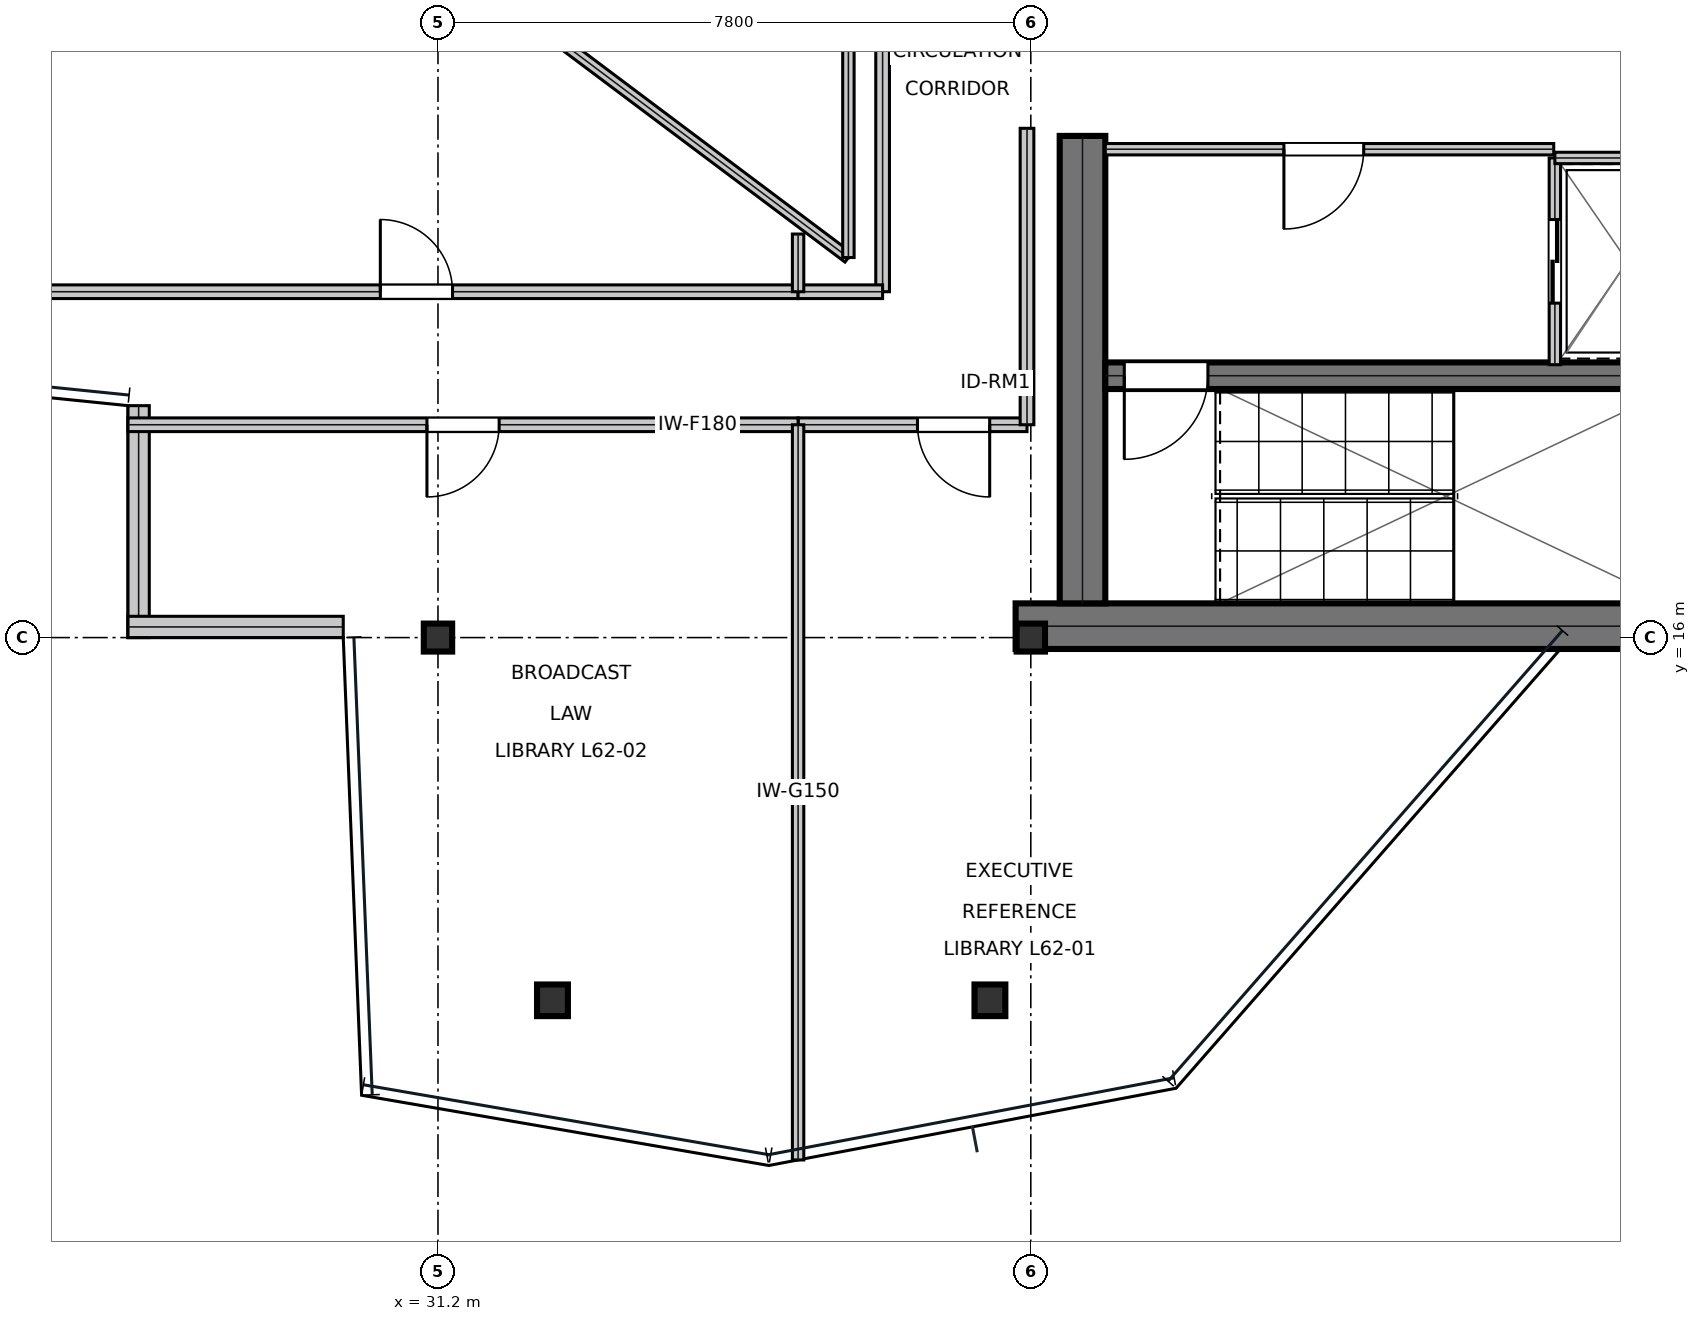
"""IFC4 building model, lengths in metres.
Left out: names, types, materials, properties, quantities, classifications, styles, units other than length and angle.
Written with IfcOpenShell. Run it as: python <this file> out.ifc"""

import sys

from ifc_helpers import new_model, si_unit, direction, frame, frame_2d, origin, origin_2d, place, context, subcontext, project, spatial, rectangle, i_section, extrude, element, fill, save


model = new_model("IFC4")
c1 = context("Model", 3, precision=1e-05, world=origin(), true_north=direction((0.0, 1.0)))
c2 = subcontext(c1, "Body", "Model", "MODEL_VIEW")
j1 = project(units=[si_unit("LENGTHUNIT", "METRE"), si_unit("PLANEANGLEUNIT", "RADIAN")], contexts=[c1])
p1 = place(None, origin())
s1 = spatial("IfcSite", under=j1, at=p1, CompositionType="ELEMENT")
p2 = place(p1, origin())
s2 = spatial("IfcBuilding", under=s1, at=p2, CompositionType="ELEMENT")
p3 = place(p2, frame((0.0, 0.0, 266.85)))
s3 = spatial("IfcBuildingStorey", under=s2, at=p3, CompositionType="ELEMENT", Elevation=266.85)
p4 = place(p3, frame((38.8, 16.15, 0.0), z_axis=(0.0, 0.0, 1.0), x_axis=(1.0, 0.0, 0.0)))
e1 = element("IfcWall", 1, at=p4, inside=s3, PredefinedType="SHEAR", context=c2, shape_type="SweptSolid", body=[
    extrude(rectangle(XDim=16.0, YDim=0.6, at=frame_2d((8.0, 0.0))), origin(), (0.0, 0.0, 1.0), 3.81),
])
p5 = place(p3, frame((39.68, 16.45, 0.0), z_axis=(0.0, 0.0, 1.0), x_axis=(0.0, 1.0, 0.0)))
e2 = element("IfcWall", 2, at=p5, inside=s3, PredefinedType="SHEAR", context=c2, shape_type="SweptSolid", body=[
    extrude(rectangle(XDim=6.15, YDim=0.6, at=frame_2d((3.075, 0.0))), origin(), (0.0, 0.0, 1.0), 3.81),
])
p6 = place(p3, frame((39.98, 19.445, 0.0), z_axis=(0.0, 0.0, 1.0), x_axis=(1.0, 0.0, 0.0)))
e3 = element("IfcWall", 3, at=p6, inside=s3, PredefinedType="SHEAR", context=c2, shape_type="SweptSolid", body=[
    extrude(rectangle(XDim=7.71, YDim=0.35, at=frame_2d((3.855, 0.0))), origin(), (0.0, 0.0, 1.0), 3.81),
])
p7 = place(p6, frame((0.25, 0.0, 0.0)))
e4 = element("IfcOpeningElement", 4, at=p7, cuts=e3, PredefinedType="OPENING", context=c2, shape_type="SweptSolid", body=[
    extrude(rectangle(XDim=1.1, YDim=2.15, at=frame_2d((0.55, 1.075))), frame((0.0, 0.185, 0.0), z_axis=(0.0, -1.0, 0.0), x_axis=(1.0, 0.0, 0.0)), (0.0, 0.0, 1.0), 0.37),
])
for number, where, z_axis, x_axis in (
    (5, (31.2, 16.0, 0.0), (0.0, 0.0, 1.0), (1.0, 0.0, 0.0)),
    (6, (39.0, 16.0, 0.0), (0.0, 0.0, 1.0), (1.0, 0.0, 0.0)),
):
    element("IfcColumn", number, at=place(p3, frame(where, z_axis=z_axis, x_axis=x_axis)), inside=s3, PredefinedType="COLUMN", context=c2, shape_type="SweptSolid", body=[
        extrude(i_section(OverallWidth=0.373, OverallDepth=0.368, WebThickness=0.015, FlangeThickness=0.024, at=origin_2d()), origin(), (0.0, 0.0, 1.0), 4.044),
    ])
for number, where, z_axis, x_axis in (
    (7, (32.706, 11.228, 0.016), (0.0, 0.0, 1.0), (1.0, 0.0, 0.0)),
    (8, (38.462, 11.228, 0.016), (0.0, 0.0, 1.0), (1.0, 0.0, 0.0)),
):
    element("IfcColumn", number, at=place(p3, frame(where, z_axis=z_axis, x_axis=x_axis)), inside=s3, PredefinedType="COLUMN", context=c2, shape_type="SweptSolid", body=[
        extrude(i_section(OverallWidth=0.406, OverallDepth=0.416, WebThickness=0.03, FlangeThickness=0.048, at=origin_2d()), origin(), (0.0, 0.0, 1.0), 4.018),
    ])
p8 = place(p3, frame((27.262, 19.051, 0.0), z_axis=(0.0, 0.0, 1.0), x_axis=(0.0, -1.0, 0.0)))
e9 = element("IfcWall", 9, at=p8, inside=s3, PredefinedType="STANDARD", context=c2, shape_type="SweptSolid", body=[
    extrude(rectangle(XDim=3.051, YDim=0.28, at=frame_2d((1.526, 0.0))), origin(), (0.0, 0.0, 1.0), 3.339),
])
p9 = place(p3, frame((27.122, 16.14, 0.0), z_axis=(0.0, 0.0, 1.0), x_axis=(1.0, 0.0, 0.0)))
e10 = element("IfcWall", 10, at=p9, inside=s3, PredefinedType="STANDARD", context=c2, shape_type="SweptSolid", body=[
    extrude(rectangle(XDim=2.832, YDim=0.28, at=frame_2d((1.416, 0.0))), origin(), (0.0, 0.0, 1.0), 3.81),
])
p10 = place(p3, frame((39.98, 22.425, 0.0), z_axis=(0.0, 0.0, 1.0), x_axis=(1.0, 0.0, 0.0)))
e11 = element("IfcWall", 11, at=p10, inside=s3, PredefinedType="PARTITIONING", context=c2, shape_type="SweptSolid", body=[
    extrude(rectangle(XDim=5.9, YDim=0.15, at=frame_2d((2.95, 0.0))), origin(), (0.0, 0.0, 1.0), 3.81),
])
p11 = place(p10, frame((2.35, 0.0, 0.0)))
e12 = element("IfcOpeningElement", 12, at=p11, cuts=e11, PredefinedType="OPENING", context=c2, shape_type="SweptSolid", body=[
    extrude(rectangle(XDim=1.05, YDim=2.15, at=frame_2d((0.525, 1.075))), frame((0.0, 0.085, 0.0), z_axis=(0.0, -1.0, 0.0), x_axis=(1.0, 0.0, 0.0)), (0.0, 0.0, 1.0), 0.17),
])
p12 = place(p3, frame((45.895, 19.59, 0.0), z_axis=(0.0, 0.0, 1.0), x_axis=(0.0, 1.0, 0.0)))
e13 = element("IfcWall", 13, at=p12, inside=s3, PredefinedType="PARTITIONING", context=c2, shape_type="SweptSolid", body=[
    extrude(rectangle(XDim=2.72, YDim=0.15, at=frame_2d((1.36, 0.0))), origin(), (0.0, 0.0, 1.0), 3.81),
])
p13 = place(p12, frame((0.81, 0.0, 0.0)))
e14 = element("IfcOpeningElement", 14, at=p13, cuts=e13, PredefinedType="OPENING", context=c2, shape_type="SweptSolid", body=[
    extrude(rectangle(XDim=1.1, YDim=2.15, at=frame_2d((0.55, 1.075))), frame((0.0, 0.085, 0.0), z_axis=(0.0, -1.0, 0.0), x_axis=(1.0, 0.0, 0.0)), (0.0, 0.0, 1.0), 0.17),
])
p14 = place(p3, frame((45.895, 22.31, 0.0), z_axis=(0.0, 0.0, 1.0), x_axis=(1.0, 0.0, 0.0)))
e15 = element("IfcWall", 15, at=p14, inside=s3, PredefinedType="PARTITIONING", context=c2, shape_type="SweptSolid", body=[
    extrude(rectangle(XDim=1.915, YDim=0.15, at=frame_2d((0.958, 0.0))), origin(), (0.0, 0.0, 1.0), 3.81),
])
p15 = place(p3, frame((35.938, 18.8, 0.0), z_axis=(0.0, 0.0, 1.0), x_axis=(1.0, 0.0, 0.0)))
e16 = element("IfcWall", 16, at=p15, inside=s3, PredefinedType="SOLIDWALL", context=c2, shape_type="SweptSolid", body=[
    extrude(rectangle(XDim=3.012, YDim=0.18, at=frame_2d((1.506, 0.0))), origin(), (0.0, 0.0, 1.0), 3.81),
])
p16 = place(p15, frame((1.571, 0.0, 0.0)))
e17 = element("IfcOpeningElement", 17, at=p16, cuts=e16, PredefinedType="OPENING", context=c2, shape_type="SweptSolid", body=[
    extrude(rectangle(XDim=0.95, YDim=2.15, at=frame_2d((0.475, 1.075))), frame((0.0, 0.1, 0.0), z_axis=(0.0, -1.0, 0.0), x_axis=(1.0, 0.0, 0.0)), (0.0, 0.0, 1.0), 0.2),
])
p17 = place(p3, frame((27.122, 18.8, 0.0), z_axis=(0.0, 0.0, 1.0), x_axis=(1.0, 0.0, 0.0)))
e18 = element("IfcWall", 18, at=p17, inside=s3, PredefinedType="SOLIDWALL", context=c2, shape_type="SweptSolid", body=[
    extrude(rectangle(XDim=8.816, YDim=0.18, at=frame_2d((4.408, 0.0))), origin(), (0.0, 0.0, 1.0), 3.27),
])
p18 = place(p17, frame((3.933, 0.0, 0.0)))
e19 = element("IfcOpeningElement", 19, at=p18, cuts=e18, PredefinedType="OPENING", context=c2, shape_type="SweptSolid", body=[
    extrude(rectangle(XDim=0.95, YDim=2.15, at=frame_2d((0.475, 1.075))), frame((0.0, 0.1, 0.0), z_axis=(0.0, -1.0, 0.0), x_axis=(1.0, 0.0, 0.0)), (0.0, 0.0, 1.0), 0.2),
])
p19 = place(p3, frame((25.895, 20.55, 0.0), z_axis=(0.0, 0.0, 1.0), x_axis=(1.0, 0.0, 0.0)))
e20 = element("IfcWall", 20, at=p19, inside=s3, PredefinedType="SOLIDWALL", context=c2, shape_type="SweptSolid", body=[
    extrude(rectangle(XDim=10.043, YDim=0.18, at=frame_2d((5.021, 0.0))), origin(), (0.0, 0.0, 1.0), 3.27),
])
p20 = place(p19, frame((4.546, 0.0, 0.0)))
e21 = element("IfcOpeningElement", 21, at=p20, cuts=e20, PredefinedType="OPENING", context=c2, shape_type="SweptSolid", body=[
    extrude(rectangle(XDim=0.95, YDim=2.15, at=frame_2d((0.475, 1.075))), frame((0.0, 0.1, 0.0), z_axis=(0.0, -1.0, 0.0), x_axis=(1.0, 0.0, 0.0)), (0.0, 0.0, 1.0), 0.2),
])
p21 = place(p3, frame((38.95, 18.8, 0.0), z_axis=(0.0, 0.0, 1.0), x_axis=(0.0, 1.0, 0.0)))
e22 = element("IfcWall", 22, at=p21, inside=s3, PredefinedType="SOLIDWALL", context=c2, shape_type="SweptSolid", body=[
    extrude(rectangle(XDim=3.9, YDim=0.18, at=frame_2d((1.95, 0.0))), origin(), (0.0, 0.0, 1.0), 3.54),
])
p22 = place(p3, frame((37.05, 20.55, 0.0), z_axis=(0.0, 0.0, 1.0), x_axis=(0.0, 1.0, 0.0)))
e23 = element("IfcWall", 23, at=p22, inside=s3, PredefinedType="SOLIDWALL", context=c2, shape_type="SweptSolid", body=[
    extrude(rectangle(XDim=8.25, YDim=0.18, at=frame_2d((4.125, 0.0))), origin(), (0.0, 0.0, 1.0), 3.54),
])
p23 = place(p3, frame((35.938, 20.55, 0.0), z_axis=(0.0, 0.0, 1.0), x_axis=(1.0, 0.0, 0.0)))
e24 = element("IfcWall", 24, at=p23, inside=s3, PredefinedType="SOLIDWALL", context=c2, shape_type="SweptSolid", body=[
    extrude(rectangle(XDim=1.112, YDim=0.18, at=frame_2d((0.556, 0.0))), origin(), (0.0, 0.0, 1.0), 3.54),
])
p24 = place(p3, frame((35.938, 9.128, 0.0), z_axis=(0.0, 0.0, 1.0), x_axis=(0.0, 1.0, 0.0)))
e25 = element("IfcWall", 25, at=p24, inside=s3, PredefinedType="MOVABLE", context=c2, shape_type="SweptSolid", body=[
    extrude(rectangle(XDim=9.672, YDim=0.15, at=frame_2d((4.836, 0.0))), origin(), (0.0, 0.0, 1.0), 3.27),
])
p25 = place(p3, frame((35.938, 20.55, 0.0), z_axis=(0.0, 0.0, 1.0), x_axis=(0.0, 1.0, 0.0)))
e26 = element("IfcWall", 26, at=p25, inside=s3, PredefinedType="MOVABLE", context=c2, shape_type="SweptSolid", body=[
    extrude(rectangle(XDim=0.759, YDim=0.15, at=frame_2d((0.379, 0.0))), origin(), (0.0, 0.0, 1.0), 3.81),
])
p26 = place(p3, frame((32.6, 24.0, 0.0), z_axis=(0.0, 0.0, 1.0), x_axis=(0.8, -0.6, 0.0)))
e27 = element("IfcWall", 27, at=p26, inside=s3, PredefinedType="MOVABLE", context=c2, shape_type="SweptSolid", body=[
    extrude(rectangle(XDim=5.0, YDim=0.15, at=frame_2d((2.5, 0.0))), origin(), (0.0, 0.0, 1.0), 3.81),
])
p27 = place(p3, frame((36.6, 21.0, 0.0), z_axis=(0.0, 0.0, 1.0), x_axis=(0.0, 1.0, 0.0)))
e28 = element("IfcWall", 28, at=p27, inside=s3, PredefinedType="MOVABLE", context=c2, shape_type="SweptSolid", body=[
    extrude(rectangle(XDim=6.0, YDim=0.15, at=frame_2d((3.0, 0.0))), origin(), (0.0, 0.0, 1.0), 3.81),
])
p28 = place(p11, frame((1.05, 0.0, 0.0), z_axis=(0.0, 0.0, 1.0), x_axis=(-1.0, 0.0, 0.0)))
e29 = element("IfcDoor", 29, at=p28, inside=s3, OperationType="SINGLE_SWING_RIGHT", PredefinedType="DOOR", context=c2, shape_type="SweptSolid", body=[
    extrude(rectangle(XDim=1.05, YDim=2.15, at=frame_2d((0.525, 1.075))), frame((0.0, 0.025, 0.0), z_axis=(0.0, -1.0, 0.0), x_axis=(1.0, 0.0, 0.0)), (0.0, 0.0, 1.0), 0.05),
])
fill(e12, e29)
p29 = place(p13, frame((1.1, 0.0, 0.0), z_axis=(0.0, 0.0, 1.0), x_axis=(-1.0, 0.0, 0.0)))
e30 = element("IfcDoor", 30, at=p29, inside=s3, OperationType="DOUBLE_DOOR_SLIDING", PredefinedType="DOOR", context=c2, shape_type="SweptSolid", body=[
    extrude(rectangle(XDim=1.1, YDim=2.15, at=frame_2d((0.55, 1.075))), frame((0.0, 0.025, 0.0), z_axis=(0.0, -1.0, 0.0), x_axis=(1.0, 0.0, 0.0)), (0.0, 0.0, 1.0), 0.05),
])
fill(e14, e30)
p30 = place(p16, frame((0.95, 0.0, 0.0), z_axis=(0.0, 0.0, 1.0), x_axis=(-1.0, 0.0, 0.0)))
e31 = element("IfcDoor", 31, at=p30, inside=s3, OperationType="SINGLE_SWING_LEFT", PredefinedType="DOOR", context=c2, shape_type="SweptSolid", body=[
    extrude(rectangle(XDim=0.95, YDim=2.15, at=frame_2d((0.475, 1.075))), frame((0.0, 0.025, 0.0), z_axis=(0.0, -1.0, 0.0), x_axis=(1.0, 0.0, 0.0)), (0.0, 0.0, 1.0), 0.05),
])
fill(e17, e31)
p31 = place(p18, frame((0.95, 0.0, 0.0), z_axis=(0.0, 0.0, 1.0), x_axis=(-1.0, 0.0, 0.0)))
e32 = element("IfcDoor", 32, at=p31, inside=s3, OperationType="SINGLE_SWING_RIGHT", PredefinedType="DOOR", context=c2, shape_type="SweptSolid", body=[
    extrude(rectangle(XDim=0.95, YDim=2.15, at=frame_2d((0.475, 1.075))), frame((0.0, 0.025, 0.0), z_axis=(0.0, -1.0, 0.0), x_axis=(1.0, 0.0, 0.0)), (0.0, 0.0, 1.0), 0.05),
])
fill(e19, e32)
p32 = place(p20, origin())
e33 = element("IfcDoor", 33, at=p32, inside=s3, OperationType="SINGLE_SWING_LEFT", PredefinedType="DOOR", context=c2, shape_type="SweptSolid", body=[
    extrude(rectangle(XDim=0.95, YDim=2.15, at=frame_2d((0.475, 1.075))), frame((0.0, 0.025, 0.0), z_axis=(0.0, -1.0, 0.0), x_axis=(1.0, 0.0, 0.0)), (0.0, 0.0, 1.0), 0.05),
])
fill(e21, e33)
p33 = place(p7, frame((1.1, 0.0, 0.0), z_axis=(0.0, 0.0, 1.0), x_axis=(-1.0, 0.0, 0.0)))
e34 = element("IfcDoor", 34, at=p33, inside=s3, OperationType="SINGLE_SWING_RIGHT", PredefinedType="DOOR", context=c2, shape_type="SweptSolid", body=[
    extrude(rectangle(XDim=1.1, YDim=2.15, at=frame_2d((0.55, 1.075))), frame((0.0, 0.025, 0.0), z_axis=(0.0, -1.0, 0.0), x_axis=(1.0, 0.0, 0.0)), (0.0, 0.0, 1.0), 0.05),
])
fill(e4, e34)
save(model, sys.argv[1])
